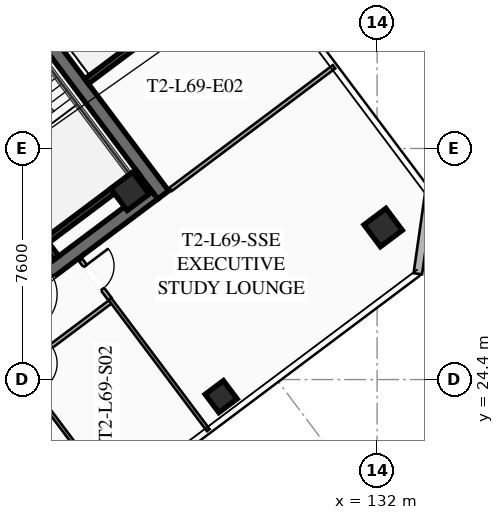
"""IFC4 building model, lengths in metres.
Left out: names, types, materials, properties, quantities, classifications, styles, units other than length and angle.
Written with IfcOpenShell. Run it as: python <this file> out.ifc"""

import sys

from ifc_helpers import new_model, si_unit, direction, frame, frame_2d, origin, origin_2d, place, context, subcontext, project, spatial, rectangle, hollow_rectangle, extrude, element, fill, save


model = new_model("IFC4")
c1 = context("Model", 3, precision=1e-05, world=origin(), true_north=direction((0.0, 1.0)))
c2 = subcontext(c1, "Body", "Model", "MODEL_VIEW")
j1 = project(units=[si_unit("LENGTHUNIT", "METRE"), si_unit("PLANEANGLEUNIT", "RADIAN")], contexts=[c1])
p1 = place(None, origin())
s1 = spatial("IfcSite", under=j1, at=p1, CompositionType="ELEMENT")
p2 = place(p1, origin())
s2 = spatial("IfcBuilding", under=s1, at=p2, CompositionType="ELEMENT")
p3 = place(p2, frame((0.0, 0.0, 255.4)))
s3 = spatial("IfcBuildingStorey", under=s2, at=p3, CompositionType="ELEMENT", Elevation=255.4)
p4 = place(p3, frame((115.604, 42.953, 0.0), z_axis=(0.0, 0.0, 1.0), x_axis=(0.600005007985, -0.799996243986, 0.0)))
e1 = element("IfcWall", 1, at=p4, inside=s3, PredefinedType="SHEAR", context=c2, shape_type="SweptSolid", body=[
    extrude(rectangle(XDim=15.6, YDim=0.45, at=frame_2d((7.8, 0.0))), origin(), (0.0, 0.0, 1.0), 4.0),
])
p5 = place(p3, frame((124.649, 30.518, 0.0), z_axis=(0.0, 0.0, 1.0), x_axis=(-0.8, -0.6, 0.0)))
e2 = element("IfcWall", 2, at=p5, inside=s3, PredefinedType="SHEAR", context=c2, shape_type="SweptSolid", body=[
    extrude(rectangle(XDim=15.26, YDim=0.45, at=frame_2d((7.63, 0.0))), origin(), (0.0, 0.0, 1.0), 4.0),
])
p6 = place(p5, frame((9.33, 0.0, 0.0)))
e3 = element("IfcOpeningElement", 3, at=p6, cuts=e2, PredefinedType="OPENING", context=c2, shape_type="SweptSolid", body=[
    extrude(rectangle(XDim=1.25, YDim=2.25, at=frame_2d((0.625, 1.125))), frame((0.0, 0.235, 0.0), z_axis=(0.0, -1.0, 0.0), x_axis=(1.0, 0.0, 0.0)), (0.0, 0.0, 1.0), 0.47),
])
p7 = place(p5, frame((4.28, 0.0, 0.0)))
e4 = element("IfcOpeningElement", 4, at=p7, cuts=e2, PredefinedType="OPENING", context=c2, shape_type="SweptSolid", body=[
    extrude(rectangle(XDim=1.25, YDim=2.25, at=frame_2d((0.625, 1.125))), frame((0.0, 0.235, 0.0), z_axis=(0.0, -1.0, 0.0), x_axis=(1.0, 0.0, 0.0)), (0.0, 0.0, 1.0), 0.47),
])
for number, where, z_axis, x_axis in (
    (5, (123.87, 30.59, 0.0), (0.0, 0.0, 1.0), (0.8, 0.6, 0.0)),
    (6, (132.2, 29.4, 0.0), (0.0, 0.0, 1.0), (0.8, 0.6, 0.0)),
):
    element("IfcColumn", number, at=place(p3, frame(where, z_axis=z_axis, x_axis=x_axis)), inside=s3, PredefinedType="COLUMN", context=c2, shape_type="SweptSolid", body=[
        extrude(hollow_rectangle(XDim=0.9, YDim=0.9, WallThickness=0.04, at=origin_2d()), origin(), (0.0, 0.0, 1.0), 3.78),
    ])
p8 = place(p3, frame((126.87, 23.84, 0.0), z_axis=(0.0, 0.0, 1.0), x_axis=(0.799999996291, 0.600000004945, 0.0)))
e7 = element("IfcColumn", 7, at=p8, inside=s3, PredefinedType="COLUMN", context=c2, shape_type="SweptSolid", body=[
    extrude(hollow_rectangle(XDim=0.75, YDim=0.75, WallThickness=0.032, at=origin_2d()), origin(), (0.0, 0.0, 1.0), 3.78),
])
p9 = place(p3, frame((133.72, 30.54, 0.0), z_axis=(0.0, 0.0, 1.0), x_axis=(-0.141370477216, -0.989956760759, 0.0)))
e8 = element("IfcWall", 8, at=p9, inside=s3, PredefinedType="SOLIDWALL", context=c2, shape_type="SweptSolid", body=[
    extrude(rectangle(XDim=2.687, YDim=0.28, at=frame_2d((1.344, 0.0))), origin(), (0.0, 0.0, 1.0), 3.78),
])
p10 = place(p3, frame((116.56, 34.92, 0.0), z_axis=(0.0, 0.0, 1.0), x_axis=(0.59999041401, -0.800007189403, 0.0)))
e9 = element("IfcWall", 9, at=p10, inside=s3, PredefinedType="SHEAR", context=c2, shape_type="SweptSolid", body=[
    extrude(rectangle(XDim=8.15, YDim=0.2, at=frame_2d((4.075, 0.0))), origin(), (0.0, 0.0, 1.0), 3.78),
])
p11 = place(p10, frame((0.45, 0.0, 0.0)))
e10 = element("IfcOpeningElement", 10, at=p11, cuts=e9, PredefinedType="OPENING", context=c2, shape_type="SweptSolid", body=[
    extrude(rectangle(XDim=1.15, YDim=2.2, at=frame_2d((0.575, 1.1))), frame((0.0, 0.11, 0.0), z_axis=(0.0, -1.0, 0.0), x_axis=(1.0, 0.0, 0.0)), (0.0, 0.0, 1.0), 0.22),
])
p12 = place(p3, frame((120.98, 28.86, 0.0), z_axis=(0.0, 0.0, 1.0), x_axis=(0.800014909178, 0.599980120581, 0.0)))
e11 = element("IfcWall", 11, at=p12, inside=s3, PredefinedType="SHEAR", context=c2, shape_type="SweptSolid", body=[
    extrude(rectangle(XDim=3.93, YDim=0.2, at=frame_2d((1.965, 0.0))), origin(), (0.0, 0.0, 1.0), 3.78),
])
p13 = place(p3, frame((122.444, 34.208, 0.0), z_axis=(0.0, 0.0, 1.0), x_axis=(0.79999138319, 0.600011488909, 0.0)))
e12 = element("IfcWall", 12, at=p13, inside=s3, PredefinedType="SHEAR", context=c2, shape_type="SweptSolid", body=[
    extrude(rectangle(XDim=3.4, YDim=0.2, at=frame_2d((1.7, 0.0))), origin(), (0.0, 0.0, 1.0), 3.78),
])
p14 = place(p3, frame((123.262, 26.984, 0.0), z_axis=(0.0, 0.0, 1.0), x_axis=(-0.799997911818, -0.600002784232, 0.0)))
e13 = element("IfcWall", 13, at=p14, inside=s3, PredefinedType="PARTITIONING", context=c2, shape_type="SweptSolid", body=[
    extrude(rectangle(XDim=14.03, YDim=0.135, at=frame_2d((7.015, 0.0))), origin(), (0.0, 0.0, 1.0), 2.971),
])
p15 = place(p14, frame((4.18, 0.0, 0.0)))
e14 = element("IfcOpeningElement", 14, at=p15, cuts=e13, PredefinedType="OPENING", context=c2, shape_type="SweptSolid", body=[
    extrude(rectangle(XDim=0.95, YDim=2.05, at=frame_2d((0.475, 1.025))), frame((0.0, 0.077, 0.0), z_axis=(0.0, -1.0, 0.0), x_axis=(1.0, 0.0, 0.0)), (0.0, 0.0, 1.0), 0.155),
])
p16 = place(p14, frame((2.47, 0.0, 0.0)))
e15 = element("IfcOpeningElement", 15, at=p16, cuts=e13, PredefinedType="OPENING", context=c2, shape_type="SweptSolid", body=[
    extrude(rectangle(XDim=0.95, YDim=2.05, at=frame_2d((0.475, 1.025))), frame((0.0, 0.077, 0.0), z_axis=(0.0, -1.0, 0.0), x_axis=(1.0, 0.0, 0.0)), (0.0, 0.0, 1.0), 0.155),
])
p17 = place(p3, frame((122.248, 28.336, 0.0), z_axis=(0.0, 0.0, 1.0), x_axis=(0.600072788757, -0.799945403258, 0.0)))
e16 = element("IfcWall", 16, at=p17, inside=s3, PredefinedType="PARTITIONING", context=c2, shape_type="SweptSolid", body=[
    extrude(rectangle(XDim=1.61, YDim=0.135, at=frame_2d((0.805, 0.0))), origin(), (0.0, 0.0, 1.0), 2.971),
])
p18 = place(p17, frame((0.25, 0.0, 0.0)))
e17 = element("IfcOpeningElement", 17, at=p18, cuts=e16, PredefinedType="OPENING", context=c2, shape_type="SweptSolid", body=[
    extrude(rectangle(XDim=0.95, YDim=2.05, at=frame_2d((0.475, 1.025))), frame((0.0, 0.077, 0.0), z_axis=(0.0, -1.0, 0.0), x_axis=(1.0, 0.0, 0.0)), (0.0, 0.0, 1.0), 0.155),
])
p19 = place(p3, frame((123.408, 20.456, 0.0), z_axis=(0.0, 0.0, 1.0), x_axis=(-0.60000746914, 0.79999439809, 0.0)))
e18 = element("IfcWall", 18, at=p19, inside=s3, PredefinedType="PARTITIONING", context=c2, shape_type="SweptSolid", body=[
    extrude(rectangle(XDim=5.23, YDim=0.11, at=frame_2d((2.615, 0.0))), origin(), (0.0, 0.0, 1.0), 2.971),
])
p20 = place(p3, frame((126.448, 22.736, 0.0), z_axis=(0.0, 0.0, 1.0), x_axis=(-0.59998550531, 0.800010870812, 0.0)))
e19 = element("IfcWall", 19, at=p20, inside=s3, PredefinedType="PARTITIONING", context=c2, shape_type="SweptSolid", body=[
    extrude(rectangle(XDim=5.39, YDim=0.11, at=frame_2d((2.695, 0.0))), origin(), (0.0, 0.0, 1.0), 2.971),
])
p21 = place(p3, frame((125.208, 30.656, 0.0), z_axis=(0.0, 0.0, 1.0), x_axis=(0.8, 0.6, 0.0)))
e20 = element("IfcWall", 20, at=p21, inside=s3, PredefinedType="PARTITIONING", context=c2, shape_type="SweptSolid", body=[
    extrude(rectangle(XDim=6.72, YDim=0.135, at=frame_2d((3.36, 0.0))), origin(), (0.0, 0.0, 1.0), 2.971),
])
p22 = place(p18, origin())
e21 = element("IfcDoor", 21, at=p22, inside=s3, OperationType="SINGLE_SWING_LEFT", PredefinedType="DOOR", context=c2, shape_type="SweptSolid", body=[
    extrude(rectangle(XDim=0.95, YDim=2.05, at=frame_2d((0.475, 1.025))), frame((0.0, 0.025, 0.0), z_axis=(0.0, -1.0, 0.0), x_axis=(1.0, 0.0, 0.0)), (0.0, 0.0, 1.0), 0.05),
])
fill(e17, e21)
save(model, sys.argv[1])
